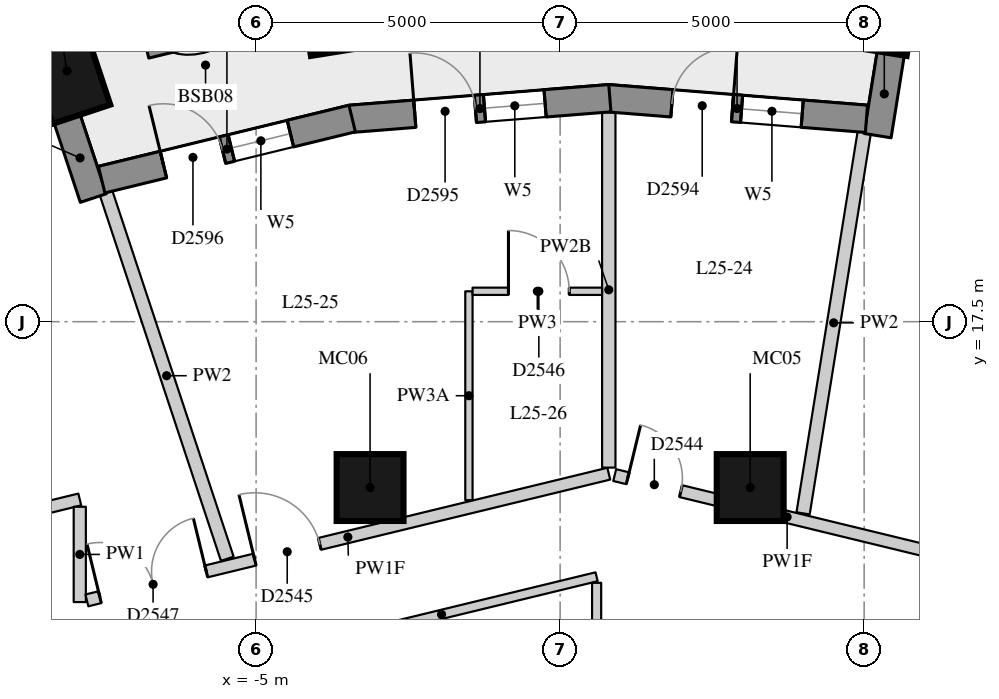
"""IFC4 building model, lengths in metres.
Left out: names, types, materials, properties, quantities, classifications, styles, units other than length and angle.
Written with IfcOpenShell. Run it as: python <this file> out.ifc"""

import sys

from ifc_helpers import new_model, si_unit, direction, frame, frame_2d, origin, origin_2d, place, context, subcontext, project, spatial, rectangle, extrude, element, fill, save


model = new_model("IFC4")
c1 = context("Model", 3, precision=1e-05, world=origin(), true_north=direction((0.0, 1.0)))
c2 = subcontext(c1, "Body", "Model", "MODEL_VIEW")
j1 = project(units=[si_unit("LENGTHUNIT", "METRE"), si_unit("PLANEANGLEUNIT", "RADIAN")], contexts=[c1])
p1 = place(None, origin())
s1 = spatial("IfcSite", under=j1, at=p1, CompositionType="ELEMENT")
p2 = place(p1, origin())
s2 = spatial("IfcBuilding", under=s1, at=p2, CompositionType="ELEMENT")
p3 = place(p2, frame((0.0, 0.0, 92.2)))
s3 = spatial("IfcBuildingStorey", under=s2, at=p3, CompositionType="ELEMENT", Elevation=92.2)
for number, where, z_axis, x_axis in (
    (1, (5.323, 22.691, 0.0), (0.0, 0.0, 1.0), (0.159, 0.987, 0.0)),
    (2, (-3.724, 22.691, 0.0), (0.0, 0.0, 1.0), (-0.159, 0.987, 0.0)),
    (3, (-8.11, 21.624, 0.0), (0.0, 0.0, 1.0), (-0.315, 0.949, 0.0)),
):
    element("IfcColumn", number, at=place(p3, frame(where, z_axis=z_axis, x_axis=x_axis)), inside=s3, PredefinedType="COLUMN", context=c2, shape_type="SweptSolid", body=[
        extrude(rectangle(XDim=1.5, YDim=1.0, at=origin_2d()), origin(), (0.0, 0.0, 1.0), 3.3),
    ])
for number, where, z_axis, x_axis in (
    (4, (3.126, 14.772, 0.0), (0.0, 0.0, 1.0), (1.0, 0.0, 0.0)),
    (5, (-3.126, 14.772, 0.0), (0.0, 0.0, 1.0), (1.0, 0.0, 0.0)),
):
    element("IfcColumn", number, at=place(p3, frame(where, z_axis=z_axis, x_axis=x_axis)), inside=s3, PredefinedType="COLUMN", context=c2, shape_type="SweptSolid", body=[
        extrude(rectangle(XDim=1.1, YDim=1.1, at=origin_2d()), origin(), (0.0, 0.0, 1.0), 3.3),
    ])
p4 = place(p3, frame((5.441, 21.932, 0.0), z_axis=(0.0, 0.0, 1.0), x_axis=(-0.158586380547, -0.987345106792, 0.0)))
e6 = element("IfcWall", 6, at=p4, inside=s3, PredefinedType="SOLIDWALL", context=c2, shape_type="SweptSolid", body=[
    extrude(rectangle(XDim=1.39, YDim=0.45, at=frame_2d((0.695, 0.0))), origin(), (0.0, 0.0, 1.0), 3.02),
])
p5 = place(p3, frame((-8.114, 20.853, 0.0), z_axis=(0.0, 0.0, 1.0), x_axis=(0.314488854508, -0.949261165534, 0.0)))
e7 = element("IfcWall", 7, at=p5, inside=s3, PredefinedType="SOLIDWALL", context=c2, shape_type="SweptSolid", body=[
    extrude(rectangle(XDim=1.39, YDim=0.45, at=frame_2d((0.695, 0.0))), origin(), (0.0, 0.0, 1.0), 3.02),
])
p6 = place(p3, frame((5.038, 20.837, 0.0), z_axis=(0.0, 0.0, 1.0), x_axis=(-0.996839780714, 0.079438350855, 0.0)))
e8 = element("IfcWall", 8, at=p6, inside=s3, PredefinedType="SOLIDWALL", context=c2, shape_type="SweptSolid", body=[
    extrude(rectangle(XDim=4.269, YDim=0.45, at=frame_2d((2.134, 0.0))), origin(), (0.0, 0.0, 1.0), 3.02),
])
p7 = place(p6, frame((1.06, 0.0, 0.4)))
e9 = element("IfcOpeningElement", 9, at=p7, cuts=e8, PredefinedType="OPENING", context=c2, shape_type="SweptSolid", body=[
    extrude(rectangle(XDim=1.0, YDim=1.75, at=frame_2d((0.5, 0.875))), frame((0.0, 0.235, 0.0), z_axis=(0.0, -1.0, 0.0), x_axis=(1.0, 0.0, 0.0)), (0.0, 0.0, 1.0), 0.47),
])
p8 = place(p6, frame((2.209, 0.0, 0.0)))
e10 = element("IfcOpeningElement", 10, at=p8, cuts=e8, PredefinedType="OPENING", context=c2, shape_type="SweptSolid", body=[
    extrude(rectangle(XDim=1.0, YDim=2.15, at=frame_2d((0.5, 1.075))), frame((0.0, 0.235, 0.0), z_axis=(0.0, -1.0, 0.0), x_axis=(1.0, 0.0, 0.0)), (0.0, 0.0, 1.0), 0.47),
])
p9 = place(p3, frame((0.818, 21.176, 0.0), z_axis=(0.0, 0.0, 1.0), x_axis=(-0.996843824935, -0.079387585235, 0.0)))
e11 = element("IfcWall", 11, at=p9, inside=s3, PredefinedType="SOLIDWALL", context=c2, shape_type="SweptSolid", body=[
    extrude(rectangle(XDim=4.287, YDim=0.45, at=frame_2d((2.144, 0.0))), origin(), (0.0, 0.0, 1.0), 3.02),
])
p10 = place(p9, frame((1.068, 0.0, 0.4)))
e12 = element("IfcOpeningElement", 12, at=p10, cuts=e11, PredefinedType="OPENING", context=c2, shape_type="SweptSolid", body=[
    extrude(rectangle(XDim=1.0, YDim=1.75, at=frame_2d((0.5, 0.875))), frame((0.0, 0.235, 0.0), z_axis=(0.0, -1.0, 0.0), x_axis=(1.0, 0.0, 0.0)), (0.0, 0.0, 1.0), 0.47),
])
p11 = place(p9, frame((2.219, 0.0, 0.0)))
e13 = element("IfcOpeningElement", 13, at=p11, cuts=e11, PredefinedType="OPENING", context=c2, shape_type="SweptSolid", body=[
    extrude(rectangle(XDim=1.0, YDim=2.15, at=frame_2d((0.5, 1.075))), frame((0.0, 0.235, 0.0), z_axis=(0.0, -1.0, 0.0), x_axis=(1.0, 0.0, 0.0)), (0.0, 0.0, 1.0), 0.47),
])
p12 = place(p3, frame((-3.42, 20.841, 0.0), z_axis=(0.0, 0.0, 1.0), x_axis=(-0.971511611373, -0.23699195971, 0.0)))
e14 = element("IfcWall", 14, at=p12, inside=s3, PredefinedType="SOLIDWALL", context=c2, shape_type="SweptSolid", body=[
    extrude(rectangle(XDim=4.241, YDim=0.45, at=frame_2d((2.121, 0.0))), origin(), (0.0, 0.0, 1.0), 3.02),
])
p13 = place(p12, frame((1.045, 0.0, 0.4)))
e15 = element("IfcOpeningElement", 15, at=p13, cuts=e14, PredefinedType="OPENING", context=c2, shape_type="SweptSolid", body=[
    extrude(rectangle(XDim=1.0, YDim=1.75, at=frame_2d((0.5, 0.875))), frame((0.0, 0.235, 0.0), z_axis=(0.0, -1.0, 0.0), x_axis=(1.0, 0.0, 0.0)), (0.0, 0.0, 1.0), 0.47),
])
p14 = place(p12, frame((2.196, 0.0, 0.0)))
e16 = element("IfcOpeningElement", 16, at=p14, cuts=e14, PredefinedType="OPENING", context=c2, shape_type="SweptSolid", body=[
    extrude(rectangle(XDim=1.0, YDim=2.15, at=frame_2d((0.5, 1.075))), frame((0.0, 0.235, 0.0), z_axis=(0.0, -1.0, 0.0), x_axis=(1.0, 0.0, 0.0)), (0.0, 0.0, 1.0), 0.47),
])
p15 = place(p3, frame((-5.099, 22.601, 0.0), z_axis=(0.0, 0.0, 1.0), x_axis=(-0.971654974133, -0.23640349245, 0.0)))
e17 = element("IfcWall", 17, at=p15, inside=s3, PredefinedType="USERDEFINED", context=c2, shape_type="SweptSolid", body=[
    extrude(rectangle(XDim=1.8, YDim=0.7, at=frame_2d((0.9, 0.0))), origin(), (0.0, 0.0, 1.0), 0.75),
])
p16 = place(p3, frame((-9.884, 14.092, 0.0), z_axis=(0.0, 0.0, 1.0), x_axis=(0.971512281799, 0.236989211388, 0.0)))
e18 = element("IfcWall", 18, at=p16, inside=s3, PredefinedType="PARTITIONING", context=c2, shape_type="SweptSolid", body=[
    extrude(rectangle(XDim=2.042, YDim=0.2, at=frame_2d((1.021, 0.0))), origin(), (0.0, 0.0, 1.0), 3.02),
])
p17 = place(p3, frame((-7.9, 14.456, 0.0), z_axis=(0.0, 0.0, 1.0), x_axis=(0.0, -1.0, 0.0)))
e19 = element("IfcWall", 19, at=p17, inside=s3, PredefinedType="PARTITIONING", context=c2, shape_type="SweptSolid", body=[
    extrude(rectangle(XDim=1.567, YDim=0.2, at=frame_2d((0.784, 0.0))), origin(), (0.0, 0.0, 1.0), 3.02),
])
p18 = place(p3, frame((-7.783, 12.916, 0.0), z_axis=(0.0, 0.0, 1.0), x_axis=(0.971770455305, 0.235928341232, 0.0)))
e20 = element("IfcWall", 20, at=p18, inside=s3, PredefinedType="PARTITIONING", context=c2, shape_type="SweptSolid", body=[
    extrude(rectangle(XDim=8.832, YDim=0.2, at=frame_2d((4.416, 0.0))), origin(), (0.0, 0.0, 1.0), 2.42),
])
p19 = place(p18, frame((2.84, 0.0, 0.0)))
e21 = element("IfcOpeningElement", 21, at=p19, cuts=e20, PredefinedType="OPENING", context=c2, shape_type="SweptSolid", body=[
    extrude(rectangle(XDim=1.1, YDim=2.1, at=frame_2d((0.55, 1.05))), frame((0.0, 0.11, 0.0), z_axis=(0.0, -1.0, 0.0), x_axis=(1.0, 0.0, 0.0)), (0.0, 0.0, 1.0), 0.22),
])
p20 = place(p18, frame((0.22, 0.0, 0.0)))
e22 = element("IfcOpeningElement", 22, at=p20, cuts=e20, PredefinedType="OPENING", context=c2, shape_type="SweptSolid", body=[
    extrude(rectangle(XDim=1.8, YDim=2.1, at=frame_2d((0.9, 1.05))), frame((0.0, 0.11, 0.0), z_axis=(0.0, -1.0, 0.0), x_axis=(1.0, 0.0, 0.0)), (0.0, 0.0, 1.0), 0.22),
])
p21 = place(p3, frame((0.898, 14.977, 0.0), z_axis=(0.0, 0.0, 1.0), x_axis=(0.971773711573, -0.235914928515, 0.0)))
e23 = element("IfcWall", 23, at=p21, inside=s3, PredefinedType="PARTITIONING", context=c2, shape_type="SweptSolid", body=[
    extrude(rectangle(XDim=5.836, YDim=0.2, at=frame_2d((2.918, 0.0))), origin(), (0.0, 0.0, 1.0), 2.42),
])
p22 = place(p21, frame((0.22, 0.0, 0.0)))
e24 = element("IfcOpeningElement", 24, at=p22, cuts=e23, PredefinedType="OPENING", context=c2, shape_type="SweptSolid", body=[
    extrude(rectangle(XDim=0.9, YDim=2.1, at=frame_2d((0.45, 1.05))), frame((0.0, 0.11, 0.0), z_axis=(0.0, -1.0, 0.0), x_axis=(1.0, 0.0, 0.0)), (0.0, 0.0, 1.0), 0.22),
])
p23 = place(p3, frame((-4.5, 12.067, 0.0), z_axis=(0.0, 0.0, 1.0), x_axis=(0.971799407652, 0.23580905684, 0.0)))
e25 = element("IfcWall", 25, at=p23, inside=s3, PredefinedType="PARTITIONING", context=c2, shape_type="SweptSolid", body=[
    extrude(rectangle(XDim=5.248, YDim=0.15, at=frame_2d((2.624, 0.0))), origin(), (0.0, 0.0, 1.0), 3.02),
])
p24 = place(p3, frame((0.6, 13.205, 0.0), z_axis=(0.0, 0.0, 1.0), x_axis=(0.0, -1.0, 0.0)))
e26 = element("IfcWall", 26, at=p24, inside=s3, PredefinedType="PARTITIONING", context=c2, shape_type="SweptSolid", body=[
    extrude(rectangle(XDim=4.055, YDim=0.15, at=frame_2d((2.027, 0.0))), origin(), (0.0, 0.0, 1.0), 3.02),
])
p25 = place(p3, frame((5.002, 20.614, 0.0), z_axis=(0.0, 0.0, 1.0), x_axis=(-0.158494605855, -0.987359843175, 0.0)))
e27 = element("IfcWall", 27, at=p25, inside=s3, PredefinedType="PARTITIONING", context=c2, shape_type="SweptSolid", body=[
    extrude(rectangle(XDim=6.346, YDim=0.22, at=frame_2d((3.173, 0.0))), origin(), (0.0, 0.0, 1.0), 3.02),
])
p26 = place(p3, frame((0.8, 20.948, 0.0), z_axis=(0.0, 0.0, 1.0), x_axis=(0.0, -1.0, 0.0)))
e28 = element("IfcWall", 28, at=p26, inside=s3, PredefinedType="PARTITIONING", context=c2, shape_type="SweptSolid", body=[
    extrude(rectangle(XDim=5.848, YDim=0.22, at=frame_2d((2.924, 0.0))), origin(), (0.0, 0.0, 1.0), 2.57),
])
p27 = place(p3, frame((-7.469, 19.622, 0.0), z_axis=(0.0, 0.0, 1.0), x_axis=(0.314576080141, -0.94923226336, 0.0)))
e29 = element("IfcWall", 29, at=p27, inside=s3, PredefinedType="PARTITIONING", context=c2, shape_type="SweptSolid", body=[
    extrude(rectangle(XDim=6.343, YDim=0.22, at=frame_2d((3.171, 0.0))), origin(), (0.0, 0.0, 1.0), 3.02),
])
p28 = place(p3, frame((-1.5, 14.565, 0.0), z_axis=(0.0, 0.0, 1.0), x_axis=(0.0, 1.0, 0.0)))
e30 = element("IfcWall", 30, at=p28, inside=s3, PredefinedType="PARTITIONING", context=c2, shape_type="SweptSolid", body=[
    extrude(rectangle(XDim=3.435, YDim=0.12, at=frame_2d((1.718, 0.0))), origin(), (0.0, 0.0, 1.0), 2.57),
])
p29 = place(p3, frame((-1.44, 18.0, 0.0), z_axis=(0.0, 0.0, 1.0), x_axis=(1.0, 0.0, 0.0)))
e31 = element("IfcWall", 31, at=p29, inside=s3, PredefinedType="PARTITIONING", context=c2, shape_type="SweptSolid", body=[
    extrude(rectangle(XDim=2.13, YDim=0.12, at=frame_2d((1.065, 0.0))), origin(), (0.0, 0.0, 1.0), 3.02),
])
p30 = place(p29, frame((0.59, 0.0, 0.0)))
e32 = element("IfcOpeningElement", 32, at=p30, cuts=e31, PredefinedType="OPENING", context=c2, shape_type="SweptSolid", body=[
    extrude(rectangle(XDim=1.0, YDim=2.1, at=frame_2d((0.5, 1.05))), frame((0.0, 0.07, 0.0), z_axis=(0.0, -1.0, 0.0), x_axis=(1.0, 0.0, 0.0)), (0.0, 0.0, 1.0), 0.14),
])
p31 = place(p7, origin())
e33 = element("IfcWindow", 33, at=p31, inside=s3, PartitioningType="SINGLE_PANEL", PredefinedType="WINDOW", context=c2, shape_type="SweptSolid", body=[
    extrude(rectangle(XDim=1.0, YDim=1.75, at=frame_2d((0.5, 0.875))), frame((0.0, 0.035, 0.0), z_axis=(0.0, -1.0, 0.0), x_axis=(1.0, 0.0, 0.0)), (0.0, 0.0, 1.0), 0.06),
])
fill(e9, e33)
p32 = place(p8, frame((1.0, 0.0, 0.0), z_axis=(0.0, 0.0, 1.0), x_axis=(-1.0, 0.0, 0.0)))
e34 = element("IfcDoor", 34, at=p32, inside=s3, OperationType="SINGLE_SWING_RIGHT", PredefinedType="DOOR", context=c2, shape_type="SweptSolid", body=[
    extrude(rectangle(XDim=1.0, YDim=2.15, at=frame_2d((0.5, 1.075))), frame((0.0, 0.075, 0.0), z_axis=(0.0, -1.0, 0.0), x_axis=(1.0, 0.0, 0.0)), (0.0, 0.0, 1.0), 0.05),
])
fill(e10, e34)
p33 = place(p10, origin())
e35 = element("IfcWindow", 35, at=p33, inside=s3, PartitioningType="SINGLE_PANEL", PredefinedType="WINDOW", context=c2, shape_type="SweptSolid", body=[
    extrude(rectangle(XDim=1.0, YDim=1.75, at=frame_2d((0.5, 0.875))), frame((0.0, 0.035, 0.0), z_axis=(0.0, -1.0, 0.0), x_axis=(1.0, 0.0, 0.0)), (0.0, 0.0, 1.0), 0.06),
])
fill(e12, e35)
p34 = place(p11, frame((1.0, 0.0, 0.0), z_axis=(0.0, 0.0, 1.0), x_axis=(-1.0, 0.0, 0.0)))
e36 = element("IfcDoor", 36, at=p34, inside=s3, OperationType="SINGLE_SWING_LEFT", PredefinedType="DOOR", context=c2, shape_type="SweptSolid", body=[
    extrude(rectangle(XDim=1.0, YDim=2.15, at=frame_2d((0.5, 1.075))), frame((0.0, 0.075, 0.0), z_axis=(0.0, -1.0, 0.0), x_axis=(1.0, 0.0, 0.0)), (0.0, 0.0, 1.0), 0.05),
])
fill(e13, e36)
p35 = place(p13, origin())
e37 = element("IfcWindow", 37, at=p35, inside=s3, PartitioningType="SINGLE_PANEL", PredefinedType="WINDOW", context=c2, shape_type="SweptSolid", body=[
    extrude(rectangle(XDim=1.0, YDim=1.75, at=frame_2d((0.5, 0.875))), frame((0.0, 0.035, 0.0), z_axis=(0.0, -1.0, 0.0), x_axis=(1.0, 0.0, 0.0)), (0.0, 0.0, 1.0), 0.06),
])
fill(e15, e37)
p36 = place(p14, frame((1.0, 0.0, 0.0), z_axis=(0.0, 0.0, 1.0), x_axis=(-1.0, 0.0, 0.0)))
e38 = element("IfcDoor", 38, at=p36, inside=s3, OperationType="SINGLE_SWING_LEFT", PredefinedType="DOOR", context=c2, shape_type="SweptSolid", body=[
    extrude(rectangle(XDim=1.0, YDim=2.15, at=frame_2d((0.5, 1.075))), frame((0.0, 0.075, 0.0), z_axis=(0.0, -1.0, 0.0), x_axis=(1.0, 0.0, 0.0)), (0.0, 0.0, 1.0), 0.05),
])
fill(e16, e38)
p37 = place(p22, origin())
e39 = element("IfcDoor", 39, at=p37, inside=s3, OperationType="SINGLE_SWING_LEFT", PredefinedType="DOOR", context=c2, shape_type="SweptSolid", body=[
    extrude(rectangle(XDim=0.9, YDim=2.1, at=frame_2d((0.45, 1.05))), frame((0.0, 0.025, 0.0), z_axis=(0.0, -1.0, 0.0), x_axis=(1.0, 0.0, 0.0)), (0.0, 0.0, 1.0), 0.05),
])
fill(e24, e39)
p38 = place(p19, origin())
e40 = element("IfcDoor", 40, at=p38, inside=s3, OperationType="SINGLE_SWING_LEFT", PredefinedType="DOOR", context=c2, shape_type="SweptSolid", body=[
    extrude(rectangle(XDim=1.1, YDim=2.1, at=frame_2d((0.55, 1.05))), frame((0.0, 0.025, 0.0), z_axis=(0.0, -1.0, 0.0), x_axis=(1.0, 0.0, 0.0)), (0.0, 0.0, 1.0), 0.05),
])
fill(e21, e40)
p39 = place(p30, origin())
e41 = element("IfcDoor", 41, at=p39, inside=s3, OperationType="SINGLE_SWING_LEFT", PredefinedType="DOOR", context=c2, shape_type="SweptSolid", body=[
    extrude(rectangle(XDim=1.0, YDim=2.1, at=frame_2d((0.5, 1.05))), frame((0.0, 0.025, 0.0), z_axis=(0.0, -1.0, 0.0), x_axis=(1.0, 0.0, 0.0)), (0.0, 0.0, 1.0), 0.05),
])
fill(e32, e41)
p40 = place(p20, origin())
e42 = element("IfcDoor", 42, at=p40, inside=s3, OperationType="DOUBLE_DOOR_SINGLE_SWING", PredefinedType="DOOR", context=c2, shape_type="SweptSolid", body=[
    extrude(rectangle(XDim=1.8, YDim=2.1, at=frame_2d((0.9, 1.05))), frame((0.0, 0.025, 0.0), z_axis=(0.0, -1.0, 0.0), x_axis=(1.0, 0.0, 0.0)), (0.0, 0.0, 1.0), 0.05),
])
fill(e22, e42)
save(model, sys.argv[1])
